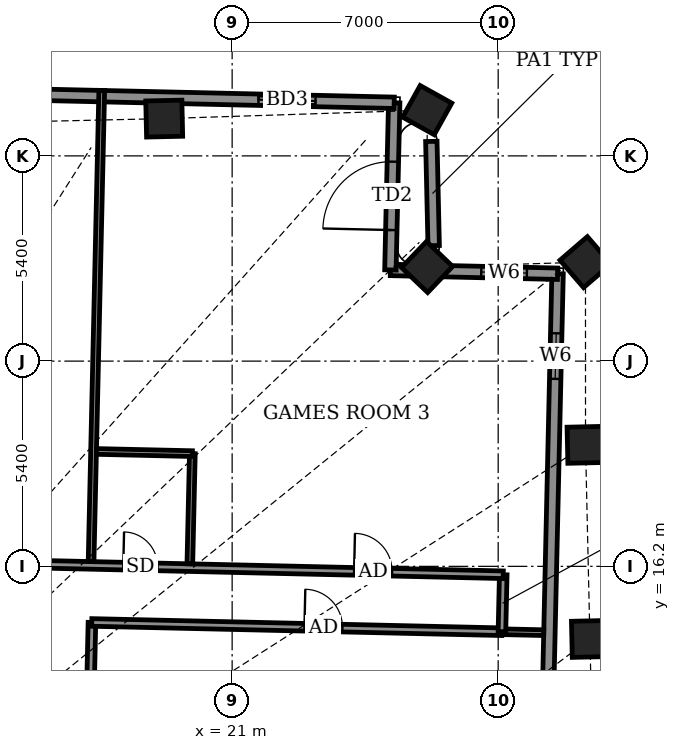
"""IFC4 building model, lengths in metres.
Left out: names, types, materials, properties, quantities, classifications, styles, units other than length and angle.
Written with IfcOpenShell. Run it as: python <this file> out.ifc"""

import sys

from ifc_helpers import new_model, si_unit, direction, frame, frame_2d, origin, origin_2d, place, context, subcontext, project, spatial, rectangle, extrude, element, fill, save


model = new_model("IFC4")
c1 = context("Model", 3, precision=1e-05, world=origin(), true_north=direction((0.0, 1.0)))
c2 = subcontext(c1, "Body", "Model", "MODEL_VIEW")
j1 = project(units=[si_unit("LENGTHUNIT", "METRE"), si_unit("PLANEANGLEUNIT", "RADIAN")], contexts=[c1])
p1 = place(None, origin())
s1 = spatial("IfcSite", under=j1, at=p1, CompositionType="ELEMENT")
p2 = place(p1, origin())
s2 = spatial("IfcBuilding", under=s1, at=p2, CompositionType="ELEMENT")
p3 = place(p2, frame((0.0, 0.0, 301.5)))
s3 = spatial("IfcBuildingStorey", under=s2, at=p3, CompositionType="ELEMENT", Elevation=301.5)
for number, where, z_axis, x_axis in (
    (1, (30.414, 14.29, -0.55), (0.0, 0.0, 1.0), (-0.023, 1.0, 0.0)),
    (2, (30.298, 19.397, -0.55), (0.0, 0.0, 1.0), (-0.023, 1.0, 0.0)),
    (3, (30.297, 24.205, -0.55), (0.0, 0.0, 1.0), (-0.652, 0.758, 0.0)),
    (4, (26.13, 24.077, -0.55), (0.0, 0.0, 1.0), (-0.723, 0.691, 0.0)),
    (5, (26.132, 28.204, -0.55), (0.0, 0.0, 1.0), (-0.874, 0.486, 0.0)),
    (6, (19.213, 27.981, -0.55), (0.0, 0.0, 1.0), (-1.0, -0.023, 0.0)),
):
    element("IfcColumn", number, at=place(p3, frame(where, z_axis=z_axis, x_axis=x_axis)), inside=s3, PredefinedType="COLUMN", context=c2, shape_type="SweptSolid", body=[
        extrude(rectangle(XDim=0.95, YDim=0.95, at=origin_2d()), origin(), (0.0, 0.0, 1.0), 4.6),
    ])
p4 = place(p3, frame((29.197, 7.774, 0.0), z_axis=(0.0, 0.0, 1.0), x_axis=(0.022689772414, 0.999742553975, 0.0)))
e7 = element("IfcWall", 7, at=p4, inside=s3, PredefinedType="SOLIDWALL", context=c2, shape_type="SweptSolid", body=[
    extrude(rectangle(XDim=16.129, YDim=0.3, at=frame_2d((8.064, 0.0))), origin(), (0.0, 0.0, 1.0), 2.1),
])
p5 = place(p4, frame((3.241, 0.0, 0.0)))
e8 = element("IfcOpeningElement", 8, at=p5, cuts=e7, PredefinedType="OPENING", context=c2, shape_type="SweptSolid", body=[
    extrude(rectangle(XDim=1.5, YDim=2.0, at=frame_2d((0.75, 1.0))), frame((0.0, 0.16, 0.0), z_axis=(0.0, -1.0, 0.0), x_axis=(1.0, 0.0, 0.0)), (0.0, 0.0, 1.0), 0.32),
])
p6 = place(p4, frame((13.362, 0.0, 0.5)))
e9 = element("IfcOpeningElement", 9, at=p6, cuts=e7, PredefinedType="OPENING", context=c2, shape_type="SweptSolid", body=[
    extrude(rectangle(XDim=1.2, YDim=1.1, at=frame_2d((0.6, 0.55))), frame((0.0, 0.16, 0.0), z_axis=(0.0, -1.0, 0.0), x_axis=(1.0, 0.0, 0.0)), (0.0, 0.0, 1.0), 0.32),
])
p7 = place(p3, frame((29.563, 23.899, 0.0), z_axis=(0.0, 0.0, 1.0), x_axis=(-0.999741204967, 0.022749133868, 0.0)))
e10 = element("IfcWall", 10, at=p7, inside=s3, PredefinedType="SOLIDWALL", context=c2, shape_type="SweptSolid", body=[
    extrude(rectangle(XDim=4.4, YDim=0.3, at=frame_2d((2.2, 0.0))), origin(), (0.0, 0.0, 1.0), 2.1),
])
p8 = place(p7, frame((0.808, 0.0, 0.5)))
e11 = element("IfcOpeningElement", 11, at=p8, cuts=e10, PredefinedType="OPENING", context=c2, shape_type="SweptSolid", body=[
    extrude(rectangle(XDim=1.2, YDim=1.1, at=frame_2d((0.6, 0.55))), frame((0.0, 0.16, 0.0), z_axis=(0.0, -1.0, 0.0), x_axis=(1.0, 0.0, 0.0)), (0.0, 0.0, 1.0), 0.32),
])
p9 = place(p3, frame((25.164, 23.999, 0.0), z_axis=(0.0, 0.0, 1.0), x_axis=(0.02269871331, 0.999742351016, 0.0)))
e12 = element("IfcWall", 12, at=p9, inside=s3, PredefinedType="SOLIDWALL", context=c2, shape_type="SweptSolid", body=[
    extrude(rectangle(XDim=4.399, YDim=0.3, at=frame_2d((2.2, 0.0))), origin(), (0.0, 0.0, 1.0), 2.1),
])
p10 = place(p9, frame((1.05, 0.0, 0.0)))
e13 = element("IfcOpeningElement", 13, at=p10, cuts=e12, PredefinedType="OPENING", context=c2, shape_type="SweptSolid", body=[
    extrude(rectangle(XDim=1.8, YDim=2.0, at=frame_2d((0.9, 1.0))), frame((0.0, 0.16, 0.0), z_axis=(0.0, -1.0, 0.0), x_axis=(1.0, 0.0, 0.0)), (0.0, 0.0, 1.0), 0.32),
])
p11 = place(p3, frame((25.264, 28.397, 0.0), z_axis=(0.0, 0.0, 1.0), x_axis=(-0.999742391375, 0.022696935658, 0.0)))
e14 = element("IfcWall", 14, at=p11, inside=s3, PredefinedType="SOLIDWALL", context=c2, shape_type="SweptSolid", body=[
    extrude(rectangle(XDim=51.9, YDim=0.3, at=frame_2d((25.95, 0.0))), origin(), (0.0, 0.0, 1.0), 2.15),
])
p12 = place(p11, frame((2.072, 0.0, 0.0)))
e15 = element("IfcOpeningElement", 15, at=p12, cuts=e14, PredefinedType="OPENING", context=c2, shape_type="SweptSolid", body=[
    extrude(rectangle(XDim=1.5, YDim=2.0, at=frame_2d((0.75, 1.0))), frame((0.0, 0.16, 0.0), z_axis=(0.0, -1.0, 0.0), x_axis=(1.0, 0.0, 0.0)), (0.0, 0.0, 1.0), 0.32),
])
p13 = place(p11, frame((9.699, 0.0, 0.5)))
e16 = element("IfcOpeningElement", 16, at=p13, cuts=e14, PredefinedType="OPENING", context=c2, shape_type="SweptSolid", body=[
    extrude(rectangle(XDim=1.2, YDim=1.1, at=frame_2d((0.6, 0.55))), frame((0.0, 0.16, 0.0), z_axis=(0.0, -1.0, 0.0), x_axis=(1.0, 0.0, 0.0)), (0.0, 0.0, 1.0), 0.32),
])
p14 = place(p11, frame((17.577, 0.0, 0.0)))
e17 = element("IfcOpeningElement", 17, at=p14, cuts=e14, PredefinedType="OPENING", context=c2, shape_type="SweptSolid", body=[
    extrude(rectangle(XDim=1.5, YDim=2.0, at=frame_2d((0.75, 1.0))), frame((0.0, 0.16, 0.0), z_axis=(0.0, -1.0, 0.0), x_axis=(1.0, 0.0, 0.0)), (0.0, 0.0, 1.0), 0.32),
])
p15 = place(p11, frame((23.4, 0.0, 0.0)))
e18 = element("IfcOpeningElement", 18, at=p15, cuts=e14, PredefinedType="OPENING", context=c2, shape_type="SweptSolid", body=[
    extrude(rectangle(XDim=1.5, YDim=2.0, at=frame_2d((0.75, 1.0))), frame((0.0, 0.16, 0.0), z_axis=(0.0, -1.0, 0.0), x_axis=(1.0, 0.0, 0.0)), (0.0, 0.0, 1.0), 0.32),
])
p16 = place(p11, frame((29.0, 0.0, 0.0)))
e19 = element("IfcOpeningElement", 19, at=p16, cuts=e14, PredefinedType="OPENING", context=c2, shape_type="SweptSolid", body=[
    extrude(rectangle(XDim=1.5, YDim=2.0, at=frame_2d((0.75, 1.0))), frame((0.0, 0.16, 0.0), z_axis=(0.0, -1.0, 0.0), x_axis=(1.0, 0.0, 0.0)), (0.0, 0.0, 1.0), 0.32),
])
p17 = place(p11, frame((34.25, 0.0, 0.5)))
e20 = element("IfcOpeningElement", 20, at=p17, cuts=e14, PredefinedType="OPENING", context=c2, shape_type="SweptSolid", body=[
    extrude(rectangle(XDim=1.2, YDim=1.1, at=frame_2d((0.6, 0.55))), frame((0.0, 0.16, 0.0), z_axis=(0.0, -1.0, 0.0), x_axis=(1.0, 0.0, 0.0)), (0.0, 0.0, 1.0), 0.32),
])
p18 = place(p11, frame((41.275, 0.0, 0.5)))
e21 = element("IfcOpeningElement", 21, at=p18, cuts=e14, PredefinedType="OPENING", context=c2, shape_type="SweptSolid", body=[
    extrude(rectangle(XDim=1.2, YDim=1.1, at=frame_2d((0.6, 0.55))), frame((0.0, 0.16, 0.0), z_axis=(0.0, -1.0, 0.0), x_axis=(1.0, 0.0, 0.0)), (0.0, 0.0, 1.0), 0.32),
])
p19 = place(p11, frame((48.325, 0.0, 0.5)))
e22 = element("IfcOpeningElement", 22, at=p19, cuts=e14, PredefinedType="OPENING", context=c2, shape_type="SweptSolid", body=[
    extrude(rectangle(XDim=1.2, YDim=1.1, at=frame_2d((0.6, 0.55))), frame((0.0, 0.16, 0.0), z_axis=(0.0, -1.0, 0.0), x_axis=(1.0, 0.0, 0.0)), (0.0, 0.0, 1.0), 0.32),
])
p20 = place(p3, frame((26.241, 27.381, 0.0), z_axis=(0.0, 0.0, 1.0), x_axis=(0.022608180041, -0.999744402433, 0.0)))
e23 = element("IfcWall", 23, at=p20, inside=s3, PredefinedType="PARAPET", context=c2, shape_type="SweptSolid", body=[
    extrude(rectangle(XDim=2.743, YDim=0.3, at=frame_2d((1.372, 0.0))), origin(), (0.0, 0.0, 1.0), 0.9),
])
p21 = place(p3, frame((17.157, 7.898, 0.0), z_axis=(0.0, 0.0, 1.0), x_axis=(0.022562209343, 0.999745440955, 0.0)))
e24 = element("IfcWall", 24, at=p21, inside=s3, PredefinedType="PARTITIONING", context=c2, shape_type="SweptSolid", body=[
    extrude(rectangle(XDim=6.828, YDim=0.2, at=frame_2d((3.414, 0.0))), origin(), (0.0, 0.0, 1.0), 2.1),
])
p22 = place(p3, frame((17.306, 14.724, 0.0), z_axis=(0.0, 0.0, 1.0), x_axis=(0.999744269809, -0.022614043969, 0.0)))
e25 = element("IfcWall", 25, at=p22, inside=s3, PredefinedType="PARTITIONING", context=c2, shape_type="SweptSolid", body=[
    extrude(rectangle(XDim=10.796, YDim=0.2, at=frame_2d((5.398, 0.0))), origin(), (0.0, 0.0, 1.0), 2.1),
])
p23 = place(p22, frame((5.598, 0.0, 0.0)))
e26 = element("IfcOpeningElement", 26, at=p23, cuts=e25, PredefinedType="OPENING", context=c2, shape_type="SweptSolid", body=[
    extrude(rectangle(XDim=1.0, YDim=2.1, at=frame_2d((0.5, 1.05))), frame((0.0, 0.11, 0.0), z_axis=(0.0, -1.0, 0.0), x_axis=(1.0, 0.0, 0.0)), (0.0, 0.0, 1.0), 0.22),
])
p24 = place(p3, frame((28.099, 14.48, 0.0), z_axis=(0.0, 0.0, 1.0), x_axis=(0.999743779532, -0.022635708216, 0.0)))
e27 = element("IfcWall", 27, at=p24, inside=s3, PredefinedType="PARTITIONING", context=c2, shape_type="SweptSolid", body=[
    extrude(rectangle(XDim=1.1, YDim=0.15, at=frame_2d((0.55, 0.0))), origin(), (0.0, 0.0, 1.0), 4.05),
])
p25 = place(p3, frame((28.099, 14.48, 0.0), z_axis=(0.0, 0.0, 1.0), x_axis=(0.022632637625, 0.99974384905, 0.0)))
e28 = element("IfcWall", 28, at=p25, inside=s3, PredefinedType="PARTITIONING", context=c2, shape_type="SweptSolid", body=[
    extrude(rectangle(XDim=1.5, YDim=0.2, at=frame_2d((0.75, 0.0))), origin(), (0.0, 0.0, 1.0), 4.05),
])
p26 = place(p3, frame((-26.362, 17.216, 0.0), z_axis=(0.0, 0.0, 1.0), x_axis=(0.999742445627, -0.022694545867, 0.0)))
e29 = element("IfcWall", 29, at=p26, inside=s3, PredefinedType="PARTITIONING", context=c2, shape_type="SweptSolid", body=[
    extrude(rectangle(XDim=54.509, YDim=0.2, at=frame_2d((27.255, 0.0))), origin(), (0.0, 0.0, 1.0), 2.1),
])
p27 = place(p26, frame((50.584, 0.0, 0.0)))
e30 = element("IfcOpeningElement", 30, at=p27, cuts=e29, PredefinedType="OPENING", context=c2, shape_type="SweptSolid", body=[
    extrude(rectangle(XDim=1.0, YDim=2.1, at=frame_2d((0.5, 1.05))), frame((0.0, 0.11, 0.0), z_axis=(0.0, -1.0, 0.0), x_axis=(1.0, 0.0, 0.0)), (0.0, 0.0, 1.0), 0.22),
])
p28 = place(p26, frame((44.509, 0.0, 0.0)))
e31 = element("IfcOpeningElement", 31, at=p28, cuts=e29, PredefinedType="OPENING", context=c2, shape_type="SweptSolid", body=[
    extrude(rectangle(XDim=0.9, YDim=2.1, at=frame_2d((0.45, 1.05))), frame((0.0, 0.11, 0.0), z_axis=(0.0, -1.0, 0.0), x_axis=(1.0, 0.0, 0.0)), (0.0, 0.0, 1.0), 0.22),
])
p29 = place(p26, frame((38.734, 0.0, 0.0)))
e32 = element("IfcOpeningElement", 32, at=p29, cuts=e29, PredefinedType="OPENING", context=c2, shape_type="SweptSolid", body=[
    extrude(rectangle(XDim=1.0, YDim=2.1, at=frame_2d((0.5, 1.05))), frame((0.0, 0.11, 0.0), z_axis=(0.0, -1.0, 0.0), x_axis=(1.0, 0.0, 0.0)), (0.0, 0.0, 1.0), 0.22),
])
p30 = place(p26, frame((33.034, 0.0, 0.0)))
e33 = element("IfcOpeningElement", 33, at=p30, cuts=e29, PredefinedType="OPENING", context=c2, shape_type="SweptSolid", body=[
    extrude(rectangle(XDim=0.9, YDim=2.1, at=frame_2d((0.45, 1.05))), frame((0.0, 0.11, 0.0), z_axis=(0.0, -1.0, 0.0), x_axis=(1.0, 0.0, 0.0)), (0.0, 0.0, 1.0), 0.22),
])
p31 = place(p26, frame((25.559, 0.0, 0.0)))
e34 = element("IfcOpeningElement", 34, at=p31, cuts=e29, PredefinedType="OPENING", context=c2, shape_type="SweptSolid", body=[
    extrude(rectangle(XDim=0.9, YDim=2.1, at=frame_2d((0.45, 1.05))), frame((0.0, 0.11, 0.0), z_axis=(0.0, -1.0, 0.0), x_axis=(1.0, 0.0, 0.0)), (0.0, 0.0, 1.0), 0.22),
])
p32 = place(p26, frame((22.884, 0.0, 0.0)))
e35 = element("IfcOpeningElement", 35, at=p32, cuts=e29, PredefinedType="OPENING", context=c2, shape_type="SweptSolid", body=[
    extrude(rectangle(XDim=0.9, YDim=2.1, at=frame_2d((0.45, 1.05))), frame((0.0, 0.11, 0.0), z_axis=(0.0, -1.0, 0.0), x_axis=(1.0, 0.0, 0.0)), (0.0, 0.0, 1.0), 0.22),
])
p33 = place(p26, frame((16.009, 0.0, 0.0)))
e36 = element("IfcOpeningElement", 36, at=p33, cuts=e29, PredefinedType="OPENING", context=c2, shape_type="SweptSolid", body=[
    extrude(rectangle(XDim=1.0, YDim=2.1, at=frame_2d((0.5, 1.05))), frame((0.0, 0.11, 0.0), z_axis=(0.0, -1.0, 0.0), x_axis=(1.0, 0.0, 0.0)), (0.0, 0.0, 1.0), 0.22),
])
p34 = place(p26, frame((10.184, 0.0, 0.0)))
e37 = element("IfcOpeningElement", 37, at=p34, cuts=e29, PredefinedType="OPENING", context=c2, shape_type="SweptSolid", body=[
    extrude(rectangle(XDim=1.0, YDim=2.1, at=frame_2d((0.5, 1.05))), frame((0.0, 0.11, 0.0), z_axis=(0.0, -1.0, 0.0), x_axis=(1.0, 0.0, 0.0)), (0.0, 0.0, 1.0), 0.22),
])
p35 = place(p26, frame((6.309, 0.0, 0.0)))
e38 = element("IfcOpeningElement", 38, at=p35, cuts=e29, PredefinedType="OPENING", context=c2, shape_type="SweptSolid", body=[
    extrude(rectangle(XDim=0.9, YDim=2.1, at=frame_2d((0.45, 1.05))), frame((0.0, 0.11, 0.0), z_axis=(0.0, -1.0, 0.0), x_axis=(1.0, 0.0, 0.0)), (0.0, 0.0, 1.0), 0.22),
])
p36 = place(p26, frame((0.2, 0.0, 0.0)))
e39 = element("IfcOpeningElement", 39, at=p36, cuts=e29, PredefinedType="OPENING", context=c2, shape_type="SweptSolid", body=[
    extrude(rectangle(XDim=1.0, YDim=2.1, at=frame_2d((0.5, 1.05))), frame((0.0, 0.11, 0.0), z_axis=(0.0, -1.0, 0.0), x_axis=(1.0, 0.0, 0.0)), (0.0, 0.0, 1.0), 0.22),
])
p37 = place(p26, frame((3.909, 0.0, 0.0)))
e40 = element("IfcOpeningElement", 40, at=p37, cuts=e29, PredefinedType="OPENING", context=c2, shape_type="SweptSolid", body=[
    extrude(rectangle(XDim=0.9, YDim=2.1, at=frame_2d((0.45, 1.05))), frame((0.0, 0.11, 0.0), z_axis=(0.0, -1.0, 0.0), x_axis=(1.0, 0.0, 0.0)), (0.0, 0.0, 1.0), 0.22),
])
p38 = place(p3, frame((17.288, 16.325, 0.0), z_axis=(0.0, 0.0, 1.0), x_axis=(0.022661475803, 0.999743195783, 0.0)))
e41 = element("IfcWall", 41, at=p38, inside=s3, PredefinedType="PARTITIONING", context=c2, shape_type="SweptSolid", body=[
    extrude(rectangle(XDim=12.4, YDim=0.15, at=frame_2d((6.2, 0.0))), origin(), (0.0, 0.0, 1.0), 2.1),
])
p39 = place(p3, frame((19.887, 16.266, 0.0), z_axis=(0.0, 0.0, 1.0), x_axis=(0.022725229174, 0.999741748633, 0.0)))
e42 = element("IfcWall", 42, at=p39, inside=s3, PredefinedType="PARTITIONING", context=c2, shape_type="SweptSolid", body=[
    extrude(rectangle(XDim=2.901, YDim=0.15, at=frame_2d((1.45, 0.0))), origin(), (0.0, 0.0, 1.0), 2.1),
])
p40 = place(p3, frame((17.429, 19.223, 0.0), z_axis=(0.0, 0.0, 1.0), x_axis=(0.9997461113, -0.022532486354, 0.0)))
e43 = element("IfcWall", 43, at=p40, inside=s3, PredefinedType="PARTITIONING", context=c2, shape_type="SweptSolid", body=[
    extrude(rectangle(XDim=2.525, YDim=0.15, at=frame_2d((1.262, 0.0))), origin(), (0.0, 0.0, 1.0), 2.1),
])
p41 = place(p6, origin())
e44 = element("IfcWindow", 44, at=p41, inside=s3, PartitioningType="SINGLE_PANEL", PredefinedType="WINDOW", context=c2, shape_type="SweptSolid", body=[
    extrude(rectangle(XDim=1.2, YDim=1.1, at=frame_2d((0.6, 0.55))), frame((0.0, 0.03, 0.0), z_axis=(0.0, -1.0, 0.0), x_axis=(1.0, 0.0, 0.0)), (0.0, 0.0, 1.0), 0.06),
])
fill(e9, e44)
p42 = place(p8, origin())
e45 = element("IfcWindow", 45, at=p42, inside=s3, PartitioningType="SINGLE_PANEL", PredefinedType="WINDOW", context=c2, shape_type="SweptSolid", body=[
    extrude(rectangle(XDim=1.2, YDim=1.1, at=frame_2d((0.6, 0.55))), frame((0.0, 0.03, 0.0), z_axis=(0.0, -1.0, 0.0), x_axis=(1.0, 0.0, 0.0)), (0.0, 0.0, 1.0), 0.06),
])
fill(e11, e45)
p43 = place(p10, origin())
e46 = element("IfcDoor", 46, at=p43, inside=s3, OperationType="DOUBLE_DOOR_SINGLE_SWING", PredefinedType="DOOR", context=c2, shape_type="SweptSolid", body=[
    extrude(rectangle(XDim=1.8, YDim=2.0, at=frame_2d((0.9, 1.0))), frame((0.0, 0.025, 0.0), z_axis=(0.0, -1.0, 0.0), x_axis=(1.0, 0.0, 0.0)), (0.0, 0.0, 1.0), 0.05),
])
fill(e13, e46)
p44 = place(p12, origin())
e47 = element("IfcDoor", 47, at=p44, inside=s3, OperationType="SLIDING_TO_LEFT", PredefinedType="DOOR", context=c2, shape_type="SweptSolid", body=[
    extrude(rectangle(XDim=1.5, YDim=2.0, at=frame_2d((0.75, 1.0))), frame((0.0, 0.025, 0.0), z_axis=(0.0, -1.0, 0.0), x_axis=(1.0, 0.0, 0.0)), (0.0, 0.0, 1.0), 0.05),
])
fill(e15, e47)
p45 = place(p23, origin())
e48 = element("IfcDoor", 48, at=p45, inside=s3, OperationType="SINGLE_SWING_LEFT", PredefinedType="DOOR", context=c2, shape_type="SweptSolid", body=[
    extrude(rectangle(XDim=1.0, YDim=2.1, at=frame_2d((0.5, 1.05))), frame((0.0, 0.025, 0.0), z_axis=(0.0, -1.0, 0.0), x_axis=(1.0, 0.0, 0.0)), (0.0, 0.0, 1.0), 0.05),
])
fill(e26, e48)
p46 = place(p27, origin())
e49 = element("IfcDoor", 49, at=p46, inside=s3, OperationType="SINGLE_SWING_RIGHT", PredefinedType="DOOR", context=c2, shape_type="SweptSolid", body=[
    extrude(rectangle(XDim=1.0, YDim=2.1, at=frame_2d((0.5, 1.05))), frame((0.0, 0.025, 0.0), z_axis=(0.0, -1.0, 0.0), x_axis=(1.0, 0.0, 0.0)), (0.0, 0.0, 1.0), 0.05),
])
fill(e30, e49)
p47 = place(p28, origin())
e50 = element("IfcDoor", 50, at=p47, inside=s3, OperationType="SINGLE_SWING_LEFT", PredefinedType="DOOR", context=c2, shape_type="SweptSolid", body=[
    extrude(rectangle(XDim=0.9, YDim=2.1, at=frame_2d((0.45, 1.05))), frame((0.0, 0.025, 0.0), z_axis=(0.0, -1.0, 0.0), x_axis=(1.0, 0.0, 0.0)), (0.0, 0.0, 1.0), 0.05),
])
fill(e31, e50)
save(model, sys.argv[1])
